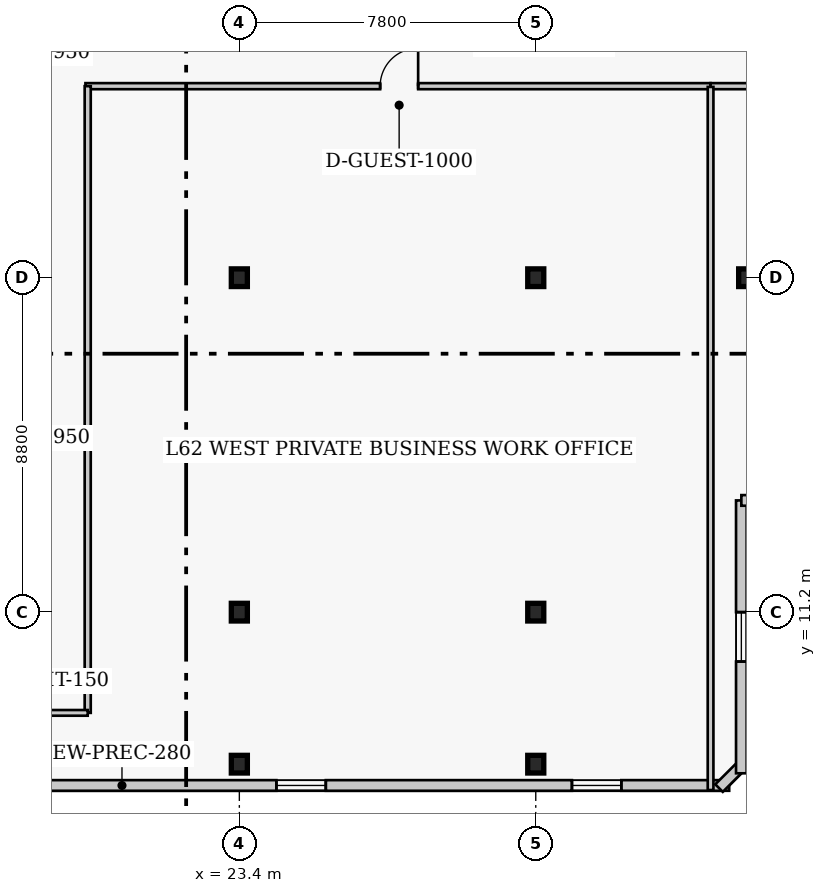
"""IFC4 building model, lengths in metres.
Left out: names, types, materials, properties, quantities, classifications, styles, units other than length and angle.
Written with IfcOpenShell. Run it as: python <this file> out.ifc"""

import sys

from ifc_helpers import new_model, si_unit, direction, frame, frame_2d, origin, origin_2d, place, context, subcontext, project, spatial, rectangle, i_section, extrude, element, fill, save


model = new_model("IFC4")
c1 = context("Model", 3, precision=1e-05, world=origin(), true_north=direction((0.0, 1.0)))
c2 = subcontext(c1, "Body", "Model", "MODEL_VIEW")
j1 = project(units=[si_unit("LENGTHUNIT", "METRE"), si_unit("PLANEANGLEUNIT", "RADIAN")], contexts=[c1])
p1 = place(None, origin())
s1 = spatial("IfcSite", under=j1, at=p1, CompositionType="ELEMENT")
p2 = place(p1, origin())
s2 = spatial("IfcBuilding", under=s1, at=p2, CompositionType="ELEMENT")
p3 = place(p2, frame((0.0, 0.0, 249.4)))
s3 = spatial("IfcBuildingStorey", under=s2, at=p3, CompositionType="ELEMENT", Elevation=249.4)
for number, where, z_axis, x_axis in (
    (1, (23.4, 11.2, 0.0), (0.0, 0.0, 1.0), (1.0, 0.0, 0.0)),
    (2, (23.4, 20.0, 0.0), (0.0, 0.0, 1.0), (1.0, 0.0, 0.0)),
    (3, (31.2, 11.2, 0.0), (0.0, 0.0, 1.0), (1.0, 0.0, 0.0)),
    (4, (31.2, 20.0, 0.0), (0.0, 0.0, 1.0), (1.0, 0.0, 0.0)),
    (5, (36.75, 20.0, 0.0), (0.0, 0.0, 1.0), (1.0, 0.0, 0.0)),
    (6, (23.4, 7.2, 0.0), (0.0, 0.0, 1.0), (1.0, 0.0, 0.0)),
    (7, (31.2, 7.2, 0.0), (0.0, 0.0, 1.0), (1.0, 0.0, 0.0)),
):
    element("IfcColumn", number, at=place(p3, frame(where, z_axis=z_axis, x_axis=x_axis)), inside=s3, PredefinedType="COLUMN", context=c2, shape_type="SweptSolid", body=[
        extrude(i_section(OverallWidth=0.422, OverallDepth=0.465, WebThickness=0.045, FlangeThickness=0.073, FilletRadius=0.017, at=origin_2d()), origin(), (0.0, 0.0, 1.0), 4.0),
    ])
p4 = place(p3, frame((11.46, 6.64, 0.0), z_axis=(0.0, 0.0, 1.0), x_axis=(1.0, 0.0, 0.0)))
e8 = element("IfcWall", 8, at=p4, inside=s3, PredefinedType="SOLIDWALL", context=c2, shape_type="SweptSolid", body=[
    extrude(rectangle(XDim=24.83, YDim=0.28, at=frame_2d((12.415, 0.0))), origin(), (0.0, 0.0, 1.0), 3.76),
])
p5 = place(p4, frame((3.488, 0.0, 0.85)))
e9 = element("IfcOpeningElement", 9, at=p5, cuts=e8, PredefinedType="OPENING", context=c2, shape_type="SweptSolid", body=[
    extrude(rectangle(XDim=1.3, YDim=1.7, at=frame_2d((0.65, 0.85))), frame((0.0, 0.15, 0.0), z_axis=(0.0, -1.0, 0.0), x_axis=(1.0, 0.0, 0.0)), (0.0, 0.0, 1.0), 0.3),
])
p6 = place(p4, frame((12.915, 0.0, 0.85)))
e10 = element("IfcOpeningElement", 10, at=p6, cuts=e8, PredefinedType="OPENING", context=c2, shape_type="SweptSolid", body=[
    extrude(rectangle(XDim=1.3, YDim=1.7, at=frame_2d((0.65, 0.85))), frame((0.0, 0.15, 0.0), z_axis=(0.0, -1.0, 0.0), x_axis=(1.0, 0.0, 0.0)), (0.0, 0.0, 1.0), 0.3),
])
p7 = place(p4, frame((20.692, 0.0, 0.85)))
e11 = element("IfcOpeningElement", 11, at=p7, cuts=e8, PredefinedType="OPENING", context=c2, shape_type="SweptSolid", body=[
    extrude(rectangle(XDim=1.3, YDim=1.7, at=frame_2d((0.65, 0.85))), frame((0.0, 0.15, 0.0), z_axis=(0.0, -1.0, 0.0), x_axis=(1.0, 0.0, 0.0)), (0.0, 0.0, 1.0), 0.3),
])
p8 = place(p3, frame((36.023, 6.571, 0.0), z_axis=(0.0, 0.0, 1.0), x_axis=(0.707106781187, 0.707106781187, 0.0)))
e12 = element("IfcWall", 12, at=p8, inside=s3, PredefinedType="SOLIDWALL", context=c2, shape_type="SweptSolid", body=[
    extrude(rectangle(XDim=0.928, YDim=0.28, at=frame_2d((0.464, 0.0))), origin(), (0.0, 0.0, 1.0), 3.76),
])
p9 = place(p3, frame((36.61, 6.96, 0.0), z_axis=(0.0, 0.0, 1.0), x_axis=(0.0, 1.0, 0.0)))
e13 = element("IfcWall", 13, at=p9, inside=s3, PredefinedType="SOLIDWALL", context=c2, shape_type="SweptSolid", body=[
    extrude(rectangle(XDim=7.18, YDim=0.28, at=frame_2d((3.59, 0.0))), origin(), (0.0, 0.0, 1.0), 3.76),
])
p10 = place(p9, frame((2.94, 0.0, 0.85)))
e14 = element("IfcOpeningElement", 14, at=p10, cuts=e13, PredefinedType="OPENING", context=c2, shape_type="SweptSolid", body=[
    extrude(rectangle(XDim=1.3, YDim=1.7, at=frame_2d((0.65, 0.85))), frame((0.0, 0.15, 0.0), z_axis=(0.0, -1.0, 0.0), x_axis=(1.0, 0.0, 0.0)), (0.0, 0.0, 1.0), 0.3),
])
p11 = place(p3, frame((36.61, 14.14, 0.0), z_axis=(0.0, 0.0, 1.0), x_axis=(1.0, 0.0, 0.0)))
e15 = element("IfcWall", 15, at=p11, inside=s3, PredefinedType="SOLIDWALL", context=c2, shape_type="SweptSolid", body=[
    extrude(rectangle(XDim=4.78, YDim=0.28, at=frame_2d((2.39, 0.0))), origin(), (0.0, 0.0, 1.0), 3.76),
])
p12 = place(p11, frame((1.74, 0.0, 0.85)))
e16 = element("IfcOpeningElement", 16, at=p12, cuts=e15, PredefinedType="OPENING", context=c2, shape_type="SweptSolid", body=[
    extrude(rectangle(XDim=1.3, YDim=1.7, at=frame_2d((0.65, 0.85))), frame((0.0, 0.15, 0.0), z_axis=(0.0, -1.0, 0.0), x_axis=(1.0, 0.0, 0.0)), (0.0, 0.0, 1.0), 0.3),
])
p13 = place(p3, frame((19.35, 25.04, 0.0), z_axis=(0.0, 0.0, 1.0), x_axis=(1.0, 0.0, 0.0)))
e17 = element("IfcWall", 17, at=p13, inside=s3, PredefinedType="PARTITIONING", context=c2, shape_type="SweptSolid", body=[
    extrude(rectangle(XDim=16.45, YDim=0.16, at=frame_2d((8.225, 0.0))), origin(), (0.0, 0.0, 1.0), 3.76),
])
p14 = place(p13, frame((7.755, 0.0, 0.0)))
e18 = element("IfcOpeningElement", 18, at=p14, cuts=e17, PredefinedType="OPENING", context=c2, shape_type="SweptSolid", body=[
    extrude(rectangle(XDim=1.0, YDim=2.15, at=frame_2d((0.5, 1.075))), frame((0.0, 0.09, 0.0), z_axis=(0.0, -1.0, 0.0), x_axis=(1.0, 0.0, 0.0)), (0.0, 0.0, 1.0), 0.18),
])
p15 = place(p3, frame((35.8, 25.04, 0.0), z_axis=(0.0, 0.0, 1.0), x_axis=(1.0, 0.0, 0.0)))
e19 = element("IfcWall", 19, at=p15, inside=s3, PredefinedType="PARTITIONING", context=c2, shape_type="SweptSolid", body=[
    extrude(rectangle(XDim=25.36, YDim=0.16, at=frame_2d((12.68, 0.0))), origin(), (0.0, 0.0, 1.0), 3.76),
])
p16 = place(p15, frame((1.518, 0.0, 0.0)))
e20 = element("IfcOpeningElement", 20, at=p16, cuts=e19, PredefinedType="OPENING", context=c2, shape_type="SweptSolid", body=[
    extrude(rectangle(XDim=0.95, YDim=2.1, at=frame_2d((0.475, 1.05))), frame((0.0, 0.09, 0.0), z_axis=(0.0, -1.0, 0.0), x_axis=(1.0, 0.0, 0.0)), (0.0, 0.0, 1.0), 0.18),
])
p17 = place(p15, frame((9.278, 0.0, 0.0)))
e21 = element("IfcOpeningElement", 21, at=p17, cuts=e19, PredefinedType="OPENING", context=c2, shape_type="SweptSolid", body=[
    extrude(rectangle(XDim=1.0, YDim=2.15, at=frame_2d((0.5, 1.075))), frame((0.0, 0.09, 0.0), z_axis=(0.0, -1.0, 0.0), x_axis=(1.0, 0.0, 0.0)), (0.0, 0.0, 1.0), 0.18),
])
p18 = place(p15, frame((16.06, 0.0, 0.0)))
e22 = element("IfcOpeningElement", 22, at=p18, cuts=e19, PredefinedType="OPENING", context=c2, shape_type="SweptSolid", body=[
    extrude(rectangle(XDim=0.95, YDim=2.1, at=frame_2d((0.475, 1.05))), frame((0.0, 0.09, 0.0), z_axis=(0.0, -1.0, 0.0), x_axis=(1.0, 0.0, 0.0)), (0.0, 0.0, 1.0), 0.18),
])
p19 = place(p15, frame((18.985, 0.0, 0.0)))
e23 = element("IfcOpeningElement", 23, at=p19, cuts=e19, PredefinedType="OPENING", context=c2, shape_type="SweptSolid", body=[
    extrude(rectangle(XDim=0.95, YDim=2.1, at=frame_2d((0.475, 1.05))), frame((0.0, 0.09, 0.0), z_axis=(0.0, -1.0, 0.0), x_axis=(1.0, 0.0, 0.0)), (0.0, 0.0, 1.0), 0.18),
])
p20 = place(p15, frame((23.815, 0.0, 0.0)))
e24 = element("IfcOpeningElement", 24, at=p20, cuts=e19, PredefinedType="OPENING", context=c2, shape_type="SweptSolid", body=[
    extrude(rectangle(XDim=0.95, YDim=2.1, at=frame_2d((0.475, 1.05))), frame((0.0, 0.09, 0.0), z_axis=(0.0, -1.0, 0.0), x_axis=(1.0, 0.0, 0.0)), (0.0, 0.0, 1.0), 0.18),
])
p21 = place(p3, frame((19.41, 8.55, 0.0), z_axis=(0.0, 0.0, 1.0), x_axis=(0.0, 1.0, 0.0)))
e25 = element("IfcWall", 25, at=p21, inside=s3, PredefinedType="PARTITIONING", context=c2, shape_type="SweptSolid", body=[
    extrude(rectangle(XDim=16.49, YDim=0.16, at=frame_2d((8.245, 0.0))), origin(), (0.0, 0.0, 1.0), 3.356),
])
p22 = place(p3, frame((17.19, 8.55, 0.0), z_axis=(0.0, 0.0, 1.0), x_axis=(1.0, 0.0, 0.0)))
e26 = element("IfcWall", 26, at=p22, inside=s3, PredefinedType="PARTITIONING", context=c2, shape_type="SweptSolid", body=[
    extrude(rectangle(XDim=2.22, YDim=0.15, at=frame_2d((1.11, 0.0))), origin(), (0.0, 0.0, 1.0), 3.76),
])
p23 = place(p3, frame((35.8, 6.52, 0.0), z_axis=(0.0, 0.0, 1.0), x_axis=(0.0, 1.0, 0.0)))
e27 = element("IfcWall", 27, at=p23, inside=s3, PredefinedType="PARTITIONING", context=c2, shape_type="SweptSolid", body=[
    extrude(rectangle(XDim=18.5, YDim=0.15, at=frame_2d((9.25, 0.0))), origin(), (0.0, 0.0, 1.0), 3.76),
])
p24 = place(p6, origin())
e28 = element("IfcWindow", 28, at=p24, inside=s3, PartitioningType="SINGLE_PANEL", PredefinedType="WINDOW", context=c2, shape_type="SweptSolid", body=[
    extrude(rectangle(XDim=1.3, YDim=1.7, at=frame_2d((0.65, 0.85))), frame((0.0, 0.03, 0.0), z_axis=(0.0, -1.0, 0.0), x_axis=(1.0, 0.0, 0.0)), (0.0, 0.0, 1.0), 0.06),
])
fill(e10, e28)
p25 = place(p7, origin())
e29 = element("IfcWindow", 29, at=p25, inside=s3, PartitioningType="SINGLE_PANEL", PredefinedType="WINDOW", context=c2, shape_type="SweptSolid", body=[
    extrude(rectangle(XDim=1.3, YDim=1.7, at=frame_2d((0.65, 0.85))), frame((0.0, 0.03, 0.0), z_axis=(0.0, -1.0, 0.0), x_axis=(1.0, 0.0, 0.0)), (0.0, 0.0, 1.0), 0.06),
])
fill(e11, e29)
p26 = place(p10, origin())
e30 = element("IfcWindow", 30, at=p26, inside=s3, PartitioningType="SINGLE_PANEL", PredefinedType="WINDOW", context=c2, shape_type="SweptSolid", body=[
    extrude(rectangle(XDim=1.3, YDim=1.7, at=frame_2d((0.65, 0.85))), frame((0.0, 0.03, 0.0), z_axis=(0.0, -1.0, 0.0), x_axis=(1.0, 0.0, 0.0)), (0.0, 0.0, 1.0), 0.06),
])
fill(e14, e30)
p27 = place(p14, origin())
e31 = element("IfcDoor", 31, at=p27, inside=s3, OperationType="SINGLE_SWING_RIGHT", PredefinedType="DOOR", context=c2, shape_type="SweptSolid", body=[
    extrude(rectangle(XDim=1.0, YDim=2.15, at=frame_2d((0.5, 1.075))), frame((0.0, 0.025, 0.0), z_axis=(0.0, -1.0, 0.0), x_axis=(1.0, 0.0, 0.0)), (0.0, 0.0, 1.0), 0.05),
])
fill(e18, e31)
save(model, sys.argv[1])
